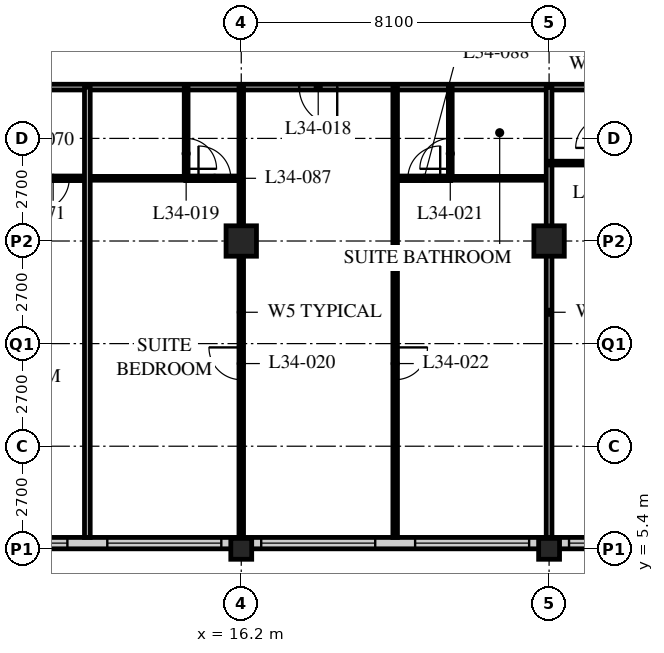
"""IFC4 building model, lengths in metres.
Left out: names, types, materials, properties, quantities, classifications, styles, units other than length and angle.
Written with IfcOpenShell. Run it as: python <this file> out.ifc"""

import sys

from ifc_helpers import new_model, si_unit, direction, frame, frame_2d, origin, origin_2d, place, context, subcontext, project, spatial, rectangle, hollow_rectangle, extrude, element, fill, save


model = new_model("IFC4")
c1 = context("Model", 3, precision=1e-05, world=origin(), true_north=direction((0.0, 1.0)))
c2 = subcontext(c1, "Body", "Model", "MODEL_VIEW")
j1 = project(units=[si_unit("LENGTHUNIT", "METRE"), si_unit("PLANEANGLEUNIT", "RADIAN")], contexts=[c1])
p1 = place(None, origin())
s1 = spatial("IfcSite", under=j1, at=p1, CompositionType="ELEMENT")
p2 = place(p1, origin())
s2 = spatial("IfcBuilding", under=s1, at=p2, CompositionType="ELEMENT")
p3 = place(p2, frame((0.0, 0.0, 134.0)))
s3 = spatial("IfcBuildingStorey", under=s2, at=p3, CompositionType="ELEMENT", Elevation=134.0)
p4 = place(p3, frame((16.2, 5.4, 0.0), z_axis=(0.0, 0.0, 1.0), x_axis=(1.0, 0.0, 0.0)))
e1 = element("IfcColumn", 1, at=p4, inside=s3, PredefinedType="COLUMN", context=c2, shape_type="SweptSolid", body=[
    extrude(hollow_rectangle(XDim=0.55, YDim=0.55, WallThickness=0.04, at=origin_2d()), origin(), (0.0, 0.0, 1.0), 3.4),
])
p5 = place(p3, frame((16.2, 13.5, 0.0), z_axis=(0.0, 0.0, 1.0), x_axis=(1.0, 0.0, 0.0)))
e2 = element("IfcColumn", 2, at=p5, inside=s3, PredefinedType="COLUMN", context=c2, shape_type="SweptSolid", body=[
    extrude(hollow_rectangle(XDim=0.8, YDim=0.8, WallThickness=0.08, at=origin_2d()), origin(), (0.0, 0.0, 1.0), 3.4),
])
p6 = place(p3, frame((24.3, 5.4, 0.0), z_axis=(0.0, 0.0, 1.0), x_axis=(1.0, 0.0, 0.0)))
e3 = element("IfcColumn", 3, at=p6, inside=s3, PredefinedType="COLUMN", context=c2, shape_type="SweptSolid", body=[
    extrude(hollow_rectangle(XDim=0.55, YDim=0.55, WallThickness=0.04, at=origin_2d()), origin(), (0.0, 0.0, 1.0), 3.4),
])
p7 = place(p3, frame((24.3, 13.5, 0.0), z_axis=(0.0, 0.0, 1.0), x_axis=(1.0, 0.0, 0.0)))
e4 = element("IfcColumn", 4, at=p7, inside=s3, PredefinedType="COLUMN", context=c2, shape_type="SweptSolid", body=[
    extrude(hollow_rectangle(XDim=0.8, YDim=0.8, WallThickness=0.08, at=origin_2d()), origin(), (0.0, 0.0, 1.0), 3.4),
])
p8 = place(p3, frame((8.4, 5.55, 0.0), z_axis=(0.0, 0.0, 1.0), x_axis=(1.0, 0.0, 0.0)))
e5 = element("IfcWall", 5, at=p8, inside=s3, PredefinedType="SOLIDWALL", context=c2, shape_type="SweptSolid", body=[
    extrude(rectangle(XDim=40.2, YDim=0.3, at=frame_2d((20.1, 0.0))), origin(), (0.0, 0.0, 1.0), 3.19),
])
p9 = place(p8, frame((0.225, 0.0, 0.9)))
e6 = element("IfcOpeningElement", 6, at=p9, cuts=e5, PredefinedType="OPENING", context=c2, shape_type="SweptSolid", body=[
    extrude(rectangle(XDim=3.0, YDim=2.0, at=frame_2d((1.5, 1.0))), frame((0.0, 0.16, 0.0), z_axis=(0.0, -1.0, 0.0), x_axis=(1.0, 0.0, 0.0)), (0.0, 0.0, 1.0), 0.32),
])
p10 = place(p8, frame((4.275, 0.0, 0.9)))
e7 = element("IfcOpeningElement", 7, at=p10, cuts=e5, PredefinedType="OPENING", context=c2, shape_type="SweptSolid", body=[
    extrude(rectangle(XDim=3.0, YDim=2.0, at=frame_2d((1.5, 1.0))), frame((0.0, 0.16, 0.0), z_axis=(0.0, -1.0, 0.0), x_axis=(1.0, 0.0, 0.0)), (0.0, 0.0, 1.0), 0.32),
])
p11 = place(p8, frame((8.325, 0.0, 0.9)))
e8 = element("IfcOpeningElement", 8, at=p11, cuts=e5, PredefinedType="OPENING", context=c2, shape_type="SweptSolid", body=[
    extrude(rectangle(XDim=3.0, YDim=2.0, at=frame_2d((1.5, 1.0))), frame((0.0, 0.16, 0.0), z_axis=(0.0, -1.0, 0.0), x_axis=(1.0, 0.0, 0.0)), (0.0, 0.0, 1.0), 0.32),
])
p12 = place(p8, frame((12.375, 0.0, 0.9)))
e9 = element("IfcOpeningElement", 9, at=p12, cuts=e5, PredefinedType="OPENING", context=c2, shape_type="SweptSolid", body=[
    extrude(rectangle(XDim=3.0, YDim=2.0, at=frame_2d((1.5, 1.0))), frame((0.0, 0.16, 0.0), z_axis=(0.0, -1.0, 0.0), x_axis=(1.0, 0.0, 0.0)), (0.0, 0.0, 1.0), 0.32),
])
p13 = place(p8, frame((16.425, 0.0, 0.9)))
e10 = element("IfcOpeningElement", 10, at=p13, cuts=e5, PredefinedType="OPENING", context=c2, shape_type="SweptSolid", body=[
    extrude(rectangle(XDim=3.0, YDim=2.0, at=frame_2d((1.5, 1.0))), frame((0.0, 0.16, 0.0), z_axis=(0.0, -1.0, 0.0), x_axis=(1.0, 0.0, 0.0)), (0.0, 0.0, 1.0), 0.32),
])
p14 = place(p8, frame((20.475, 0.0, 0.9)))
e11 = element("IfcOpeningElement", 11, at=p14, cuts=e5, PredefinedType="OPENING", context=c2, shape_type="SweptSolid", body=[
    extrude(rectangle(XDim=3.0, YDim=2.0, at=frame_2d((1.5, 1.0))), frame((0.0, 0.16, 0.0), z_axis=(0.0, -1.0, 0.0), x_axis=(1.0, 0.0, 0.0)), (0.0, 0.0, 1.0), 0.32),
])
p15 = place(p8, frame((24.525, 0.0, 0.9)))
e12 = element("IfcOpeningElement", 12, at=p15, cuts=e5, PredefinedType="OPENING", context=c2, shape_type="SweptSolid", body=[
    extrude(rectangle(XDim=3.0, YDim=2.0, at=frame_2d((1.5, 1.0))), frame((0.0, 0.16, 0.0), z_axis=(0.0, -1.0, 0.0), x_axis=(1.0, 0.0, 0.0)), (0.0, 0.0, 1.0), 0.32),
])
p16 = place(p8, frame((28.575, 0.0, 0.9)))
e13 = element("IfcOpeningElement", 13, at=p16, cuts=e5, PredefinedType="OPENING", context=c2, shape_type="SweptSolid", body=[
    extrude(rectangle(XDim=3.0, YDim=2.0, at=frame_2d((1.5, 1.0))), frame((0.0, 0.16, 0.0), z_axis=(0.0, -1.0, 0.0), x_axis=(1.0, 0.0, 0.0)), (0.0, 0.0, 1.0), 0.32),
])
p17 = place(p8, frame((32.625, 0.0, 0.9)))
e14 = element("IfcOpeningElement", 14, at=p17, cuts=e5, PredefinedType="OPENING", context=c2, shape_type="SweptSolid", body=[
    extrude(rectangle(XDim=3.0, YDim=2.0, at=frame_2d((1.5, 1.0))), frame((0.0, 0.16, 0.0), z_axis=(0.0, -1.0, 0.0), x_axis=(1.0, 0.0, 0.0)), (0.0, 0.0, 1.0), 0.32),
])
p18 = place(p8, frame((36.675, 0.0, 0.9)))
e15 = element("IfcOpeningElement", 15, at=p18, cuts=e5, PredefinedType="OPENING", context=c2, shape_type="SweptSolid", body=[
    extrude(rectangle(XDim=3.0, YDim=2.0, at=frame_2d((1.5, 1.0))), frame((0.0, 0.16, 0.0), z_axis=(0.0, -1.0, 0.0), x_axis=(1.0, 0.0, 0.0)), (0.0, 0.0, 1.0), 0.32),
])
p19 = place(p3, frame((8.1, 17.55, 0.0), z_axis=(0.0, 0.0, 1.0), x_axis=(1.0, 0.0, 0.0)))
e16 = element("IfcWall", 16, at=p19, inside=s3, PredefinedType="PARTITIONING", context=c2, shape_type="SweptSolid", body=[
    extrude(rectangle(XDim=36.45, YDim=0.15, at=frame_2d((18.225, 0.0))), origin(), (0.0, 0.0, 1.0), 3.19),
])
p20 = place(p19, frame((9.625, 0.0, 0.0)))
e17 = element("IfcOpeningElement", 17, at=p20, cuts=e16, PredefinedType="OPENING", context=c2, shape_type="SweptSolid", body=[
    extrude(rectangle(XDim=1.0, YDim=2.1, at=frame_2d((0.5, 1.05))), frame((0.0, 0.085, 0.0), z_axis=(0.0, -1.0, 0.0), x_axis=(1.0, 0.0, 0.0)), (0.0, 0.0, 1.0), 0.17),
])
p21 = place(p19, frame((18.1, 0.0, 0.0)))
e18 = element("IfcOpeningElement", 18, at=p21, cuts=e16, PredefinedType="OPENING", context=c2, shape_type="SweptSolid", body=[
    extrude(rectangle(XDim=1.0, YDim=2.1, at=frame_2d((0.5, 1.05))), frame((0.0, 0.085, 0.0), z_axis=(0.0, -1.0, 0.0), x_axis=(1.0, 0.0, 0.0)), (0.0, 0.0, 1.0), 0.17),
])
p22 = place(p19, frame((26.75, 0.0, 0.0)))
e19 = element("IfcOpeningElement", 19, at=p22, cuts=e16, PredefinedType="OPENING", context=c2, shape_type="SweptSolid", body=[
    extrude(rectangle(XDim=1.0, YDim=2.1, at=frame_2d((0.5, 1.05))), frame((0.0, 0.085, 0.0), z_axis=(0.0, -1.0, 0.0), x_axis=(1.0, 0.0, 0.0)), (0.0, 0.0, 1.0), 0.17),
])
p23 = place(p19, frame((30.8, 0.0, 0.0)))
e20 = element("IfcOpeningElement", 20, at=p23, cuts=e16, PredefinedType="OPENING", context=c2, shape_type="SweptSolid", body=[
    extrude(rectangle(XDim=1.0, YDim=2.1, at=frame_2d((0.5, 1.05))), frame((0.0, 0.085, 0.0), z_axis=(0.0, -1.0, 0.0), x_axis=(1.0, 0.0, 0.0)), (0.0, 0.0, 1.0), 0.17),
])
p24 = place(p19, frame((1.525, 0.0, 0.0)))
e21 = element("IfcOpeningElement", 21, at=p24, cuts=e16, PredefinedType="OPENING", context=c2, shape_type="SweptSolid", body=[
    extrude(rectangle(XDim=1.0, YDim=2.1, at=frame_2d((0.5, 1.05))), frame((0.0, 0.085, 0.0), z_axis=(0.0, -1.0, 0.0), x_axis=(1.0, 0.0, 0.0)), (0.0, 0.0, 1.0), 0.17),
])
p25 = place(p19, frame((33.925, 0.0, 0.0)))
e22 = element("IfcOpeningElement", 22, at=p25, cuts=e16, PredefinedType="OPENING", context=c2, shape_type="SweptSolid", body=[
    extrude(rectangle(XDim=1.0, YDim=2.1, at=frame_2d((0.5, 1.05))), frame((0.0, 0.085, 0.0), z_axis=(0.0, -1.0, 0.0), x_axis=(1.0, 0.0, 0.0)), (0.0, 0.0, 1.0), 0.17),
])
p26 = place(p3, frame((12.15, 15.15, 0.0), z_axis=(0.0, 0.0, 1.0), x_axis=(1.0, 0.0, 0.0)))
e23 = element("IfcWall", 23, at=p26, inside=s3, PredefinedType="PARTITIONING", context=c2, shape_type="SweptSolid", body=[
    extrude(rectangle(XDim=2.6, YDim=0.1, at=frame_2d((1.3, 0.0))), origin(), (0.0, 0.0, 1.0), 3.19),
])
p27 = place(p3, frame((14.75, 17.55, 0.0), z_axis=(0.0, 0.0, 1.0), x_axis=(0.0, -1.0, 0.0)))
e24 = element("IfcWall", 24, at=p27, inside=s3, PredefinedType="PARTITIONING", context=c2, shape_type="SweptSolid", body=[
    extrude(rectangle(XDim=2.4, YDim=0.1, at=frame_2d((1.2, 0.0))), origin(), (0.0, 0.0, 1.0), 3.19),
])
p28 = place(p27, frame((1.35, 0.0, 0.0)))
e25 = element("IfcOpeningElement", 25, at=p28, cuts=e24, PredefinedType="OPENING", context=c2, shape_type="SweptSolid", body=[
    extrude(rectangle(XDim=0.8, YDim=2.1, at=frame_2d((0.4, 1.05))), frame((0.0, 0.06, 0.0), z_axis=(0.0, -1.0, 0.0), x_axis=(1.0, 0.0, 0.0)), (0.0, 0.0, 1.0), 0.12),
])
p29 = place(p3, frame((16.2, 17.55, 0.0), z_axis=(0.0, 0.0, 1.0), x_axis=(0.0, -1.0, 0.0)))
e26 = element("IfcWall", 26, at=p29, inside=s3, PredefinedType="PARTITIONING", context=c2, shape_type="SweptSolid", body=[
    extrude(rectangle(XDim=11.85, YDim=0.12, at=frame_2d((5.925, 0.0))), origin(), (0.0, 0.0, 1.0), 2.578),
])
p30 = place(p29, frame((6.85, 0.0, 0.0)))
e27 = element("IfcOpeningElement", 27, at=p30, cuts=e26, PredefinedType="OPENING", context=c2, shape_type="SweptSolid", body=[
    extrude(rectangle(XDim=0.85, YDim=2.1, at=frame_2d((0.425, 1.05))), frame((0.0, 0.07, 0.0), z_axis=(0.0, -1.0, 0.0), x_axis=(1.0, 0.0, 0.0)), (0.0, 0.0, 1.0), 0.14),
])
p31 = place(p3, frame((21.7, 15.15, 0.0), z_axis=(0.0, 0.0, 1.0), x_axis=(1.0, 0.0, 0.0)))
e28 = element("IfcWall", 28, at=p31, inside=s3, PredefinedType="PARTITIONING", context=c2, shape_type="SweptSolid", body=[
    extrude(rectangle(XDim=2.6, YDim=0.1, at=frame_2d((1.3, 0.0))), origin(), (0.0, 0.0, 1.0), 3.19),
])
p32 = place(p3, frame((21.7, 17.55, 0.0), z_axis=(0.0, 0.0, 1.0), x_axis=(0.0, -1.0, 0.0)))
e29 = element("IfcWall", 29, at=p32, inside=s3, PredefinedType="PARTITIONING", context=c2, shape_type="SweptSolid", body=[
    extrude(rectangle(XDim=2.4, YDim=0.1, at=frame_2d((1.2, 0.0))), origin(), (0.0, 0.0, 1.0), 3.19),
])
p33 = place(p32, frame((1.35, 0.0, 0.0)))
e30 = element("IfcOpeningElement", 30, at=p33, cuts=e29, PredefinedType="OPENING", context=c2, shape_type="SweptSolid", body=[
    extrude(rectangle(XDim=0.8, YDim=2.1, at=frame_2d((0.4, 1.05))), frame((0.0, 0.06, 0.0), z_axis=(0.0, -1.0, 0.0), x_axis=(1.0, 0.0, 0.0)), (0.0, 0.0, 1.0), 0.12),
])
p34 = place(p3, frame((20.25, 17.55, 0.0), z_axis=(0.0, 0.0, 1.0), x_axis=(0.0, -1.0, 0.0)))
e31 = element("IfcWall", 31, at=p34, inside=s3, PredefinedType="PARTITIONING", context=c2, shape_type="SweptSolid", body=[
    extrude(rectangle(XDim=11.85, YDim=0.12, at=frame_2d((5.925, 0.0))), origin(), (0.0, 0.0, 1.0), 3.19),
])
p35 = place(p34, frame((6.85, 0.0, 0.0)))
e32 = element("IfcOpeningElement", 32, at=p35, cuts=e31, PredefinedType="OPENING", context=c2, shape_type="SweptSolid", body=[
    extrude(rectangle(XDim=0.85, YDim=2.1, at=frame_2d((0.425, 1.05))), frame((0.0, 0.07, 0.0), z_axis=(0.0, -1.0, 0.0), x_axis=(1.0, 0.0, 0.0)), (0.0, 0.0, 1.0), 0.14),
])
p36 = place(p3, frame((24.3, 17.55, 0.0), z_axis=(0.0, 0.0, 1.0), x_axis=(0.0, -1.0, 0.0)))
e33 = element("IfcWall", 33, at=p36, inside=s3, PredefinedType="PARTITIONING", context=c2, shape_type="SweptSolid", body=[
    extrude(rectangle(XDim=11.85, YDim=0.15, at=frame_2d((5.925, 0.0))), origin(), (0.0, 0.0, 1.0), 2.578),
])
p37 = place(p3, frame((24.3, 15.55, 0.0), z_axis=(0.0, 0.0, 1.0), x_axis=(1.0, 0.0, 0.0)))
e34 = element("IfcWall", 34, at=p37, inside=s3, PredefinedType="PARTITIONING", context=c2, shape_type="SweptSolid", body=[
    extrude(rectangle(XDim=1.5, YDim=0.1, at=frame_2d((0.75, 0.0))), origin(), (0.0, 0.0, 1.0), 3.19),
])
p38 = place(p3, frame((4.1, 15.15, 0.0), z_axis=(0.0, 0.0, 1.0), x_axis=(1.0, 0.0, 0.0)))
e35 = element("IfcWall", 35, at=p38, inside=s3, PredefinedType="PARTITIONING", context=c2, shape_type="SweptSolid", body=[
    extrude(rectangle(XDim=8.05, YDim=0.12, at=frame_2d((4.025, 0.0))), origin(), (0.0, 0.0, 1.0), 3.19),
])
p39 = place(p38, frame((6.725, 0.0, 0.0)))
e36 = element("IfcOpeningElement", 36, at=p39, cuts=e35, PredefinedType="OPENING", context=c2, shape_type="SweptSolid", body=[
    extrude(rectangle(XDim=0.85, YDim=2.1, at=frame_2d((0.425, 1.05))), frame((0.0, 0.07, 0.0), z_axis=(0.0, -1.0, 0.0), x_axis=(1.0, 0.0, 0.0)), (0.0, 0.0, 1.0), 0.14),
])
p40 = place(p38, frame((2.875, 0.0, 0.0)))
e37 = element("IfcOpeningElement", 37, at=p40, cuts=e35, PredefinedType="OPENING", context=c2, shape_type="SweptSolid", body=[
    extrude(rectangle(XDim=0.85, YDim=2.1, at=frame_2d((0.425, 1.05))), frame((0.0, 0.07, 0.0), z_axis=(0.0, -1.0, 0.0), x_axis=(1.0, 0.0, 0.0)), (0.0, 0.0, 1.0), 0.14),
])
p41 = place(p3, frame((12.15, 17.55, 0.0), z_axis=(0.0, 0.0, 1.0), x_axis=(0.0, -1.0, 0.0)))
e38 = element("IfcWall", 38, at=p41, inside=s3, PredefinedType="PARTITIONING", context=c2, shape_type="SweptSolid", body=[
    extrude(rectangle(XDim=11.85, YDim=0.15, at=frame_2d((5.925, 0.0))), origin(), (0.0, 0.0, 1.0), 3.19),
])
p42 = place(p3, frame((16.2, 15.15, 0.0), z_axis=(0.0, 0.0, 1.0), x_axis=(-1.0, 0.0, 0.0)))
e39 = element("IfcWall", 39, at=p42, inside=s3, PredefinedType="PARTITIONING", context=c2, shape_type="SweptSolid", body=[
    extrude(rectangle(XDim=1.46, YDim=0.12, at=frame_2d((0.73, 0.0))), origin(), (0.0, 0.0, 1.0), 3.19),
])
p43 = place(p42, frame((0.275, 0.0, 0.0)))
e40 = element("IfcOpeningElement", 40, at=p43, cuts=e39, PredefinedType="OPENING", context=c2, shape_type="SweptSolid", body=[
    extrude(rectangle(XDim=0.85, YDim=2.1, at=frame_2d((0.425, 1.05))), frame((0.0, 0.07, 0.0), z_axis=(0.0, -1.0, 0.0), x_axis=(1.0, 0.0, 0.0)), (0.0, 0.0, 1.0), 0.14),
])
p44 = place(p3, frame((21.71, 15.15, 0.0), z_axis=(0.0, 0.0, 1.0), x_axis=(-1.0, 0.0, 0.0)))
e41 = element("IfcWall", 41, at=p44, inside=s3, PredefinedType="PARTITIONING", context=c2, shape_type="SweptSolid", body=[
    extrude(rectangle(XDim=1.46, YDim=0.12, at=frame_2d((0.73, 0.0))), origin(), (0.0, 0.0, 1.0), 3.19),
])
p45 = place(p44, frame((0.275, 0.0, 0.0)))
e42 = element("IfcOpeningElement", 42, at=p45, cuts=e41, PredefinedType="OPENING", context=c2, shape_type="SweptSolid", body=[
    extrude(rectangle(XDim=0.85, YDim=2.1, at=frame_2d((0.425, 1.05))), frame((0.0, 0.07, 0.0), z_axis=(0.0, -1.0, 0.0), x_axis=(1.0, 0.0, 0.0)), (0.0, 0.0, 1.0), 0.14),
])
p46 = place(p9, origin())
e43 = element("IfcWindow", 43, at=p46, inside=s3, PartitioningType="SINGLE_PANEL", PredefinedType="WINDOW", context=c2, shape_type="SweptSolid", body=[
    extrude(rectangle(XDim=3.0, YDim=2.0, at=frame_2d((1.5, 1.0))), frame((0.0, 0.03, 0.0), z_axis=(0.0, -1.0, 0.0), x_axis=(1.0, 0.0, 0.0)), (0.0, 0.0, 1.0), 0.06),
])
fill(e6, e43)
p47 = place(p10, origin())
e44 = element("IfcWindow", 44, at=p47, inside=s3, PartitioningType="SINGLE_PANEL", PredefinedType="WINDOW", context=c2, shape_type="SweptSolid", body=[
    extrude(rectangle(XDim=3.0, YDim=2.0, at=frame_2d((1.5, 1.0))), frame((0.0, 0.03, 0.0), z_axis=(0.0, -1.0, 0.0), x_axis=(1.0, 0.0, 0.0)), (0.0, 0.0, 1.0), 0.06),
])
fill(e7, e44)
p48 = place(p11, origin())
e45 = element("IfcWindow", 45, at=p48, inside=s3, PartitioningType="SINGLE_PANEL", PredefinedType="WINDOW", context=c2, shape_type="SweptSolid", body=[
    extrude(rectangle(XDim=3.0, YDim=2.0, at=frame_2d((1.5, 1.0))), frame((0.0, 0.03, 0.0), z_axis=(0.0, -1.0, 0.0), x_axis=(1.0, 0.0, 0.0)), (0.0, 0.0, 1.0), 0.06),
])
fill(e8, e45)
p49 = place(p12, origin())
e46 = element("IfcWindow", 46, at=p49, inside=s3, PartitioningType="SINGLE_PANEL", PredefinedType="WINDOW", context=c2, shape_type="SweptSolid", body=[
    extrude(rectangle(XDim=3.0, YDim=2.0, at=frame_2d((1.5, 1.0))), frame((0.0, 0.03, 0.0), z_axis=(0.0, -1.0, 0.0), x_axis=(1.0, 0.0, 0.0)), (0.0, 0.0, 1.0), 0.06),
])
fill(e9, e46)
p50 = place(p13, origin())
e47 = element("IfcWindow", 47, at=p50, inside=s3, PartitioningType="SINGLE_PANEL", PredefinedType="WINDOW", context=c2, shape_type="SweptSolid", body=[
    extrude(rectangle(XDim=3.0, YDim=2.0, at=frame_2d((1.5, 1.0))), frame((0.0, 0.03, 0.0), z_axis=(0.0, -1.0, 0.0), x_axis=(1.0, 0.0, 0.0)), (0.0, 0.0, 1.0), 0.06),
])
fill(e10, e47)
p51 = place(p20, origin())
e48 = element("IfcDoor", 48, at=p51, inside=s3, OperationType="SINGLE_SWING_LEFT", PredefinedType="DOOR", context=c2, shape_type="SweptSolid", body=[
    extrude(rectangle(XDim=1.0, YDim=2.1, at=frame_2d((0.5, 1.05))), frame((0.0, 0.025, 0.0), z_axis=(0.0, -1.0, 0.0), x_axis=(1.0, 0.0, 0.0)), (0.0, 0.0, 1.0), 0.05),
])
fill(e17, e48)
p52 = place(p28, origin())
e49 = element("IfcDoor", 49, at=p52, inside=s3, OperationType="SINGLE_SWING_RIGHT", PredefinedType="DOOR", context=c2, shape_type="SweptSolid", body=[
    extrude(rectangle(XDim=0.8, YDim=2.1, at=frame_2d((0.4, 1.05))), frame((0.0, 0.025, 0.0), z_axis=(0.0, -1.0, 0.0), x_axis=(1.0, 0.0, 0.0)), (0.0, 0.0, 1.0), 0.05),
])
fill(e25, e49)
p53 = place(p30, origin())
e50 = element("IfcDoor", 50, at=p53, inside=s3, OperationType="SINGLE_SWING_RIGHT", PredefinedType="DOOR", context=c2, shape_type="SweptSolid", body=[
    extrude(rectangle(XDim=0.85, YDim=2.1, at=frame_2d((0.425, 1.05))), frame((0.0, 0.025, 0.0), z_axis=(0.0, -1.0, 0.0), x_axis=(1.0, 0.0, 0.0)), (0.0, 0.0, 1.0), 0.05),
])
fill(e27, e50)
p54 = place(p33, origin())
e51 = element("IfcDoor", 51, at=p54, inside=s3, OperationType="SINGLE_SWING_LEFT", PredefinedType="DOOR", context=c2, shape_type="SweptSolid", body=[
    extrude(rectangle(XDim=0.8, YDim=2.1, at=frame_2d((0.4, 1.05))), frame((0.0, 0.025, 0.0), z_axis=(0.0, -1.0, 0.0), x_axis=(1.0, 0.0, 0.0)), (0.0, 0.0, 1.0), 0.05),
])
fill(e30, e51)
p55 = place(p35, origin())
e52 = element("IfcDoor", 52, at=p55, inside=s3, OperationType="SINGLE_SWING_LEFT", PredefinedType="DOOR", context=c2, shape_type="SweptSolid", body=[
    extrude(rectangle(XDim=0.85, YDim=2.1, at=frame_2d((0.425, 1.05))), frame((0.0, 0.025, 0.0), z_axis=(0.0, -1.0, 0.0), x_axis=(1.0, 0.0, 0.0)), (0.0, 0.0, 1.0), 0.05),
])
fill(e32, e52)
p56 = place(p39, origin())
e53 = element("IfcDoor", 53, at=p56, inside=s3, OperationType="SINGLE_SWING_RIGHT", PredefinedType="DOOR", context=c2, shape_type="SweptSolid", body=[
    extrude(rectangle(XDim=0.85, YDim=2.1, at=frame_2d((0.425, 1.05))), frame((0.0, 0.025, 0.0), z_axis=(0.0, -1.0, 0.0), x_axis=(1.0, 0.0, 0.0)), (0.0, 0.0, 1.0), 0.05),
])
fill(e36, e53)
p57 = place(p43, origin())
e54 = element("IfcDoor", 54, at=p57, inside=s3, OperationType="SINGLE_SWING_LEFT", PredefinedType="DOOR", context=c2, shape_type="SweptSolid", body=[
    extrude(rectangle(XDim=0.85, YDim=2.1, at=frame_2d((0.425, 1.05))), frame((0.0, 0.025, 0.0), z_axis=(0.0, -1.0, 0.0), x_axis=(1.0, 0.0, 0.0)), (0.0, 0.0, 1.0), 0.05),
])
fill(e40, e54)
p58 = place(p45, origin())
e55 = element("IfcDoor", 55, at=p58, inside=s3, OperationType="SINGLE_SWING_RIGHT", PredefinedType="DOOR", context=c2, shape_type="SweptSolid", body=[
    extrude(rectangle(XDim=0.85, YDim=2.1, at=frame_2d((0.425, 1.05))), frame((0.0, 0.025, 0.0), z_axis=(0.0, -1.0, 0.0), x_axis=(1.0, 0.0, 0.0)), (0.0, 0.0, 1.0), 0.05),
])
fill(e42, e55)
save(model, sys.argv[1])
